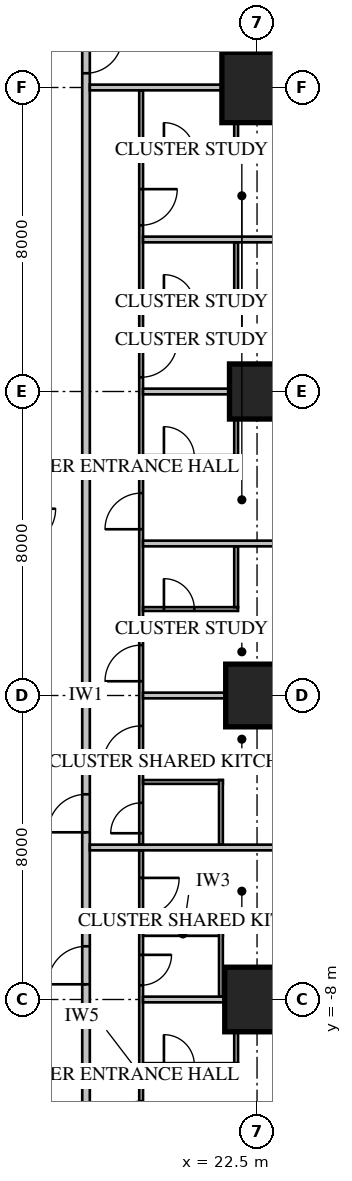
"""IFC4 building model, lengths in metres.
Left out: names, types, materials, properties, quantities, classifications, styles, units other than length and angle.
Written with IfcOpenShell. Run it as: python <this file> out.ifc"""

import sys

from ifc_helpers import new_model, si_unit, direction, frame, frame_2d, origin, origin_2d, place, context, subcontext, project, spatial, rectangle, extrude, element, fill, save


model = new_model("IFC4")
c1 = context("Model", 3, precision=1e-05, world=origin(), true_north=direction((0.0, 1.0)))
c2 = subcontext(c1, "Body", "Model", "MODEL_VIEW")
j1 = project(units=[si_unit("LENGTHUNIT", "METRE"), si_unit("PLANEANGLEUNIT", "RADIAN")], contexts=[c1])
p1 = place(None, origin())
s1 = spatial("IfcSite", under=j1, at=p1, CompositionType="ELEMENT")
p2 = place(p1, origin())
s2 = spatial("IfcBuilding", under=s1, at=p2, CompositionType="ELEMENT")
p3 = place(p2, frame((0.0, 0.0, 50.65)))
s3 = spatial("IfcBuildingStorey", under=s2, at=p3, CompositionType="ELEMENT", Elevation=50.65)
p4 = place(p3, frame((22.5, -8.0, 0.0), z_axis=(0.0, 0.0, 1.0), x_axis=(1.0, 0.0, 0.0)))
e1 = element("IfcColumn", 1, at=p4, inside=s3, PredefinedType="COLUMN", context=c2, shape_type="SweptSolid", body=[
    extrude(rectangle(XDim=1.7, YDim=1.7, at=origin_2d()), origin(), (0.0, 0.0, 1.0), 3.413),
])
p5 = place(p3, frame((22.5, 0.0, 0.0), z_axis=(0.0, 0.0, 1.0), x_axis=(1.0, 0.0, 0.0)))
e2 = element("IfcColumn", 2, at=p5, inside=s3, PredefinedType="COLUMN", context=c2, shape_type="SweptSolid", body=[
    extrude(rectangle(XDim=1.65, YDim=1.65, at=origin_2d()), origin(), (0.0, 0.0, 1.0), 3.413),
])
p6 = place(p3, frame((22.5, 8.0, 0.0), z_axis=(0.0, 0.0, 1.0), x_axis=(1.0, 0.0, 0.0)))
e3 = element("IfcColumn", 3, at=p6, inside=s3, PredefinedType="COLUMN", context=c2, shape_type="SweptSolid", body=[
    extrude(rectangle(XDim=1.45, YDim=1.45, at=origin_2d()), origin(), (0.0, 0.0, 1.0), 3.413),
])
p7 = place(p3, frame((22.5, 16.0, 0.0), z_axis=(0.0, 0.0, 1.0), x_axis=(1.0, 0.0, 0.0)))
e4 = element("IfcColumn", 4, at=p7, inside=s3, PredefinedType="COLUMN", context=c2, shape_type="SweptSolid", body=[
    extrude(rectangle(XDim=1.85, YDim=1.85, at=origin_2d()), origin(), (0.0, 0.0, 1.0), 3.413),
])
p8 = place(p3, frame((18.0, -18.0, 0.0), z_axis=(0.0, 0.0, 1.0), x_axis=(0.0, 1.0, 0.0)))
e5 = element("IfcWall", 5, at=p8, inside=s3, PredefinedType="PARTITIONING", context=c2, shape_type="SweptSolid", body=[
    extrude(rectangle(XDim=36.0, YDim=0.2, at=frame_2d((18.0, 0.0))), origin(), (0.0, 0.0, 1.0), 3.65),
])
p9 = place(p8, frame((10.4, 0.0, 0.0)))
e6 = element("IfcOpeningElement", 6, at=p9, cuts=e5, PredefinedType="OPENING", context=c2, shape_type="SweptSolid", body=[
    extrude(rectangle(XDim=1.0, YDim=2.1, at=frame_2d((0.5, 1.05))), frame((0.0, 0.12, 0.0), z_axis=(0.0, -1.0, 0.0), x_axis=(1.0, 0.0, 0.0)), (0.0, 0.0, 1.0), 0.24),
])
p10 = place(p8, frame((14.4, 0.0, 0.0)))
e7 = element("IfcOpeningElement", 7, at=p10, cuts=e5, PredefinedType="OPENING", context=c2, shape_type="SweptSolid", body=[
    extrude(rectangle(XDim=1.0, YDim=2.1, at=frame_2d((0.5, 1.05))), frame((0.0, 0.12, 0.0), z_axis=(0.0, -1.0, 0.0), x_axis=(1.0, 0.0, 0.0)), (0.0, 0.0, 1.0), 0.24),
])
p11 = place(p8, frame((0.375, 0.0, 0.0)))
e8 = element("IfcOpeningElement", 8, at=p11, cuts=e5, PredefinedType="OPENING", context=c2, shape_type="SweptSolid", body=[
    extrude(rectangle(XDim=1.0, YDim=2.1, at=frame_2d((0.5, 1.05))), frame((0.0, 0.12, 0.0), z_axis=(0.0, -1.0, 0.0), x_axis=(1.0, 0.0, 0.0)), (0.0, 0.0, 1.0), 0.24),
])
p12 = place(p8, frame((34.375, 0.0, 0.0)))
e9 = element("IfcOpeningElement", 9, at=p12, cuts=e5, PredefinedType="OPENING", context=c2, shape_type="SweptSolid", body=[
    extrude(rectangle(XDim=0.95, YDim=2.1, at=frame_2d((0.475, 1.05))), frame((0.0, 0.12, 0.0), z_axis=(0.0, -1.0, 0.0), x_axis=(1.0, 0.0, 0.0)), (0.0, 0.0, 1.0), 0.24),
])
p13 = place(p3, frame((19.45, -15.925, 0.0), z_axis=(0.0, 0.0, 1.0), x_axis=(0.0, 1.0, 0.0)))
e10 = element("IfcWall", 10, at=p13, inside=s3, PredefinedType="PARTITIONING", context=c2, shape_type="SweptSolid", body=[
    extrude(rectangle(XDim=11.85, YDim=0.1, at=frame_2d((5.925, 0.0))), origin(), (0.0, 0.0, 1.0), 3.65),
])
p14 = place(p13, frame((10.125, 0.0, 0.0)))
e11 = element("IfcOpeningElement", 11, at=p14, cuts=e10, PredefinedType="OPENING", context=c2, shape_type="SweptSolid", body=[
    extrude(rectangle(XDim=1.0, YDim=2.1, at=frame_2d((0.5, 1.05))), frame((0.0, 0.07, 0.0), z_axis=(0.0, -1.0, 0.0), x_axis=(1.0, 0.0, 0.0)), (0.0, 0.0, 1.0), 0.14),
])
p15 = place(p13, frame((8.3, 0.0, 0.0)))
e12 = element("IfcOpeningElement", 12, at=p15, cuts=e10, PredefinedType="OPENING", context=c2, shape_type="SweptSolid", body=[
    extrude(rectangle(XDim=0.8, YDim=2.1, at=frame_2d((0.4, 1.05))), frame((0.0, 0.07, 0.0), z_axis=(0.0, -1.0, 0.0), x_axis=(1.0, 0.0, 0.0)), (0.0, 0.0, 1.0), 0.14),
])
p16 = place(p13, frame((0.3, 0.0, 0.0)))
e13 = element("IfcOpeningElement", 13, at=p16, cuts=e10, PredefinedType="OPENING", context=c2, shape_type="SweptSolid", body=[
    extrude(rectangle(XDim=0.95, YDim=2.1, at=frame_2d((0.475, 1.05))), frame((0.0, 0.07, 0.0), z_axis=(0.0, -1.0, 0.0), x_axis=(1.0, 0.0, 0.0)), (0.0, 0.0, 1.0), 0.14),
])
p17 = place(p13, frame((4.3, 0.0, 0.0)))
e14 = element("IfcOpeningElement", 14, at=p17, cuts=e10, PredefinedType="OPENING", context=c2, shape_type="SweptSolid", body=[
    extrude(rectangle(XDim=0.95, YDim=2.1, at=frame_2d((0.475, 1.05))), frame((0.0, 0.07, 0.0), z_axis=(0.0, -1.0, 0.0), x_axis=(1.0, 0.0, 0.0)), (0.0, 0.0, 1.0), 0.14),
])
p18 = place(p3, frame((19.5, -6.275, 0.0), z_axis=(0.0, 0.0, 1.0), x_axis=(1.0, 0.0, 0.0)))
e15 = element("IfcWall", 15, at=p18, inside=s3, PredefinedType="PARTITIONING", context=c2, shape_type="SweptSolid", body=[
    extrude(rectangle(XDim=2.1, YDim=0.1, at=frame_2d((1.05, 0.0))), origin(), (0.0, 0.0, 1.0), 3.65),
])
p19 = place(p3, frame((21.55, -7.925, 0.0), z_axis=(0.0, 0.0, 1.0), x_axis=(0.0, 1.0, 0.0)))
e16 = element("IfcWall", 16, at=p19, inside=s3, PredefinedType="PARTITIONING", context=c2, shape_type="SweptSolid", body=[
    extrude(rectangle(XDim=1.7, YDim=0.1, at=frame_2d((0.85, 0.0))), origin(), (0.0, 0.0, 1.0), 3.65),
])
p20 = place(p3, frame((19.45, -3.925, 0.0), z_axis=(0.0, 0.0, 1.0), x_axis=(0.0, 1.0, 0.0)))
e17 = element("IfcWall", 17, at=p20, inside=s3, PredefinedType="PARTITIONING", context=c2, shape_type="SweptSolid", body=[
    extrude(rectangle(XDim=19.85, YDim=0.1, at=frame_2d((9.925, 0.0))), origin(), (0.0, 0.0, 1.0), 3.65),
])
p21 = place(p20, frame((2.125, 0.0, 0.0)))
e18 = element("IfcOpeningElement", 18, at=p21, cuts=e17, PredefinedType="OPENING", context=c2, shape_type="SweptSolid", body=[
    extrude(rectangle(XDim=1.0, YDim=2.1, at=frame_2d((0.5, 1.05))), frame((0.0, 0.07, 0.0), z_axis=(0.0, -1.0, 0.0), x_axis=(1.0, 0.0, 0.0)), (0.0, 0.0, 1.0), 0.14),
])
p22 = place(p20, frame((0.3, 0.0, 0.0)))
e19 = element("IfcOpeningElement", 19, at=p22, cuts=e17, PredefinedType="OPENING", context=c2, shape_type="SweptSolid", body=[
    extrude(rectangle(XDim=0.8, YDim=2.1, at=frame_2d((0.4, 1.05))), frame((0.0, 0.07, 0.0), z_axis=(0.0, -1.0, 0.0), x_axis=(1.0, 0.0, 0.0)), (0.0, 0.0, 1.0), 0.14),
])
p23 = place(p20, frame((4.3, 0.0, 0.0)))
e20 = element("IfcOpeningElement", 20, at=p23, cuts=e17, PredefinedType="OPENING", context=c2, shape_type="SweptSolid", body=[
    extrude(rectangle(XDim=0.95, YDim=2.1, at=frame_2d((0.475, 1.05))), frame((0.0, 0.07, 0.0), z_axis=(0.0, -1.0, 0.0), x_axis=(1.0, 0.0, 0.0)), (0.0, 0.0, 1.0), 0.14),
])
p24 = place(p20, frame((8.3, 0.0, 0.0)))
e21 = element("IfcOpeningElement", 21, at=p24, cuts=e17, PredefinedType="OPENING", context=c2, shape_type="SweptSolid", body=[
    extrude(rectangle(XDim=0.95, YDim=2.1, at=frame_2d((0.475, 1.05))), frame((0.0, 0.07, 0.0), z_axis=(0.0, -1.0, 0.0), x_axis=(1.0, 0.0, 0.0)), (0.0, 0.0, 1.0), 0.14),
])
p25 = place(p20, frame((12.3, 0.0, 0.0)))
e22 = element("IfcOpeningElement", 22, at=p25, cuts=e17, PredefinedType="OPENING", context=c2, shape_type="SweptSolid", body=[
    extrude(rectangle(XDim=0.95, YDim=2.1, at=frame_2d((0.475, 1.05))), frame((0.0, 0.07, 0.0), z_axis=(0.0, -1.0, 0.0), x_axis=(1.0, 0.0, 0.0)), (0.0, 0.0, 1.0), 0.14),
])
p26 = place(p20, frame((16.3, 0.0, 0.0)))
e23 = element("IfcOpeningElement", 23, at=p26, cuts=e17, PredefinedType="OPENING", context=c2, shape_type="SweptSolid", body=[
    extrude(rectangle(XDim=0.95, YDim=2.1, at=frame_2d((0.475, 1.05))), frame((0.0, 0.07, 0.0), z_axis=(0.0, -1.0, 0.0), x_axis=(1.0, 0.0, 0.0)), (0.0, 0.0, 1.0), 0.14),
])
p27 = place(p3, frame((19.5, -2.275, 0.0), z_axis=(0.0, 0.0, 1.0), x_axis=(1.0, 0.0, 0.0)))
e24 = element("IfcWall", 24, at=p27, inside=s3, PredefinedType="PARTITIONING", context=c2, shape_type="SweptSolid", body=[
    extrude(rectangle(XDim=2.1, YDim=0.1, at=frame_2d((1.05, 0.0))), origin(), (0.0, 0.0, 1.0), 3.65),
])
p28 = place(p3, frame((21.55, -3.925, 0.0), z_axis=(0.0, 0.0, 1.0), x_axis=(0.0, 1.0, 0.0)))
e25 = element("IfcWall", 25, at=p28, inside=s3, PredefinedType="PARTITIONING", context=c2, shape_type="SweptSolid", body=[
    extrude(rectangle(XDim=1.7, YDim=0.1, at=frame_2d((0.85, 0.0))), origin(), (0.0, 0.0, 1.0), 3.65),
])
p29 = place(p3, frame((19.5, -8.0, 0.0), z_axis=(0.0, 0.0, 1.0), x_axis=(1.0, 0.0, 0.0)))
e26 = element("IfcWall", 26, at=p29, inside=s3, PredefinedType="PARTITIONING", context=c2, shape_type="SweptSolid", body=[
    extrude(rectangle(XDim=5.2, YDim=0.15, at=frame_2d((2.6, 0.0))), origin(), (0.0, 0.0, 1.0), 3.65),
])
p30 = place(p3, frame((18.1, -4.0, 0.0), z_axis=(0.0, 0.0, 1.0), x_axis=(1.0, 0.0, 0.0)))
e27 = element("IfcWall", 27, at=p30, inside=s3, PredefinedType="PARTITIONING", context=c2, shape_type="SweptSolid", body=[
    extrude(rectangle(XDim=6.6, YDim=0.15, at=frame_2d((3.3, 0.0))), origin(), (0.0, 0.0, 1.0), 3.65),
])
p31 = place(p3, frame((19.5, 0.0, 0.0), z_axis=(0.0, 0.0, 1.0), x_axis=(1.0, 0.0, 0.0)))
e28 = element("IfcWall", 28, at=p31, inside=s3, PredefinedType="PARTITIONING", context=c2, shape_type="SweptSolid", body=[
    extrude(rectangle(XDim=5.2, YDim=0.15, at=frame_2d((2.6, 0.0))), origin(), (0.0, 0.0, 1.0), 2.888),
])
for number, where, z_axis, x_axis in (
    (29, (19.5, 4.0, 0.0), (0.0, 0.0, 1.0), (1.0, 0.0, 0.0)),
    (30, (19.5, 8.0, 0.0), (0.0, 0.0, 1.0), (1.0, 0.0, 0.0)),
    (31, (19.5, 12.0, 0.0), (0.0, 0.0, 1.0), (1.0, 0.0, 0.0)),
):
    element("IfcWall", number, at=place(p3, frame(where, z_axis=z_axis, x_axis=x_axis)), inside=s3, PredefinedType="PARTITIONING", context=c2, shape_type="SweptSolid", body=[
        extrude(rectangle(XDim=5.2, YDim=0.15, at=frame_2d((2.6, 0.0))), origin(), (0.0, 0.0, 1.0), 3.65),
    ])
p32 = place(p3, frame((18.1, 16.0, 0.0), z_axis=(0.0, 0.0, 1.0), x_axis=(1.0, 0.0, 0.0)))
e32 = element("IfcWall", 32, at=p32, inside=s3, PredefinedType="PARTITIONING", context=c2, shape_type="SweptSolid", body=[
    extrude(rectangle(XDim=6.589, YDim=0.15, at=frame_2d((3.295, 0.0))), origin(), (0.0, 0.0, 1.0), 3.65),
])
p33 = place(p3, frame((19.5, -9.725, 0.0), z_axis=(0.0, 0.0, 1.0), x_axis=(1.0, 0.0, 0.0)))
e33 = element("IfcWall", 33, at=p33, inside=s3, PredefinedType="PARTITIONING", context=c2, shape_type="SweptSolid", body=[
    extrude(rectangle(XDim=2.5, YDim=0.1, at=frame_2d((1.25, 0.0))), origin(), (0.0, 0.0, 1.0), 3.65),
])
p34 = place(p33, frame((0.55, 0.0, 0.0)))
e34 = element("IfcOpeningElement", 34, at=p34, cuts=e33, PredefinedType="OPENING", context=c2, shape_type="SweptSolid", body=[
    extrude(rectangle(XDim=0.8, YDim=2.1, at=frame_2d((0.4, 1.05))), frame((0.0, 0.07, 0.0), z_axis=(0.0, -1.0, 0.0), x_axis=(1.0, 0.0, 0.0)), (0.0, 0.0, 1.0), 0.14),
])
p35 = place(p3, frame((21.95, -9.675, 0.0), z_axis=(0.0, 0.0, 1.0), x_axis=(0.0, 1.0, 0.0)))
e35 = element("IfcWall", 35, at=p35, inside=s3, PredefinedType="PARTITIONING", context=c2, shape_type="SweptSolid", body=[
    extrude(rectangle(XDim=1.6, YDim=0.1, at=frame_2d((0.8, 0.0))), origin(), (0.0, 0.0, 1.0), 3.65),
])
p36 = place(p3, frame((19.5, 2.275, 0.0), z_axis=(0.0, 0.0, 1.0), x_axis=(1.0, 0.0, 0.0)))
e36 = element("IfcWall", 36, at=p36, inside=s3, PredefinedType="PARTITIONING", context=c2, shape_type="SweptSolid", body=[
    extrude(rectangle(XDim=2.5, YDim=0.1, at=frame_2d((1.25, 0.0))), origin(), (0.0, 0.0, 1.0), 3.65),
])
p37 = place(p36, frame((0.55, 0.0, 0.0)))
e37 = element("IfcOpeningElement", 37, at=p37, cuts=e36, PredefinedType="OPENING", context=c2, shape_type="SweptSolid", body=[
    extrude(rectangle(XDim=0.8, YDim=2.1, at=frame_2d((0.4, 1.05))), frame((0.0, 0.07, 0.0), z_axis=(0.0, -1.0, 0.0), x_axis=(1.0, 0.0, 0.0)), (0.0, 0.0, 1.0), 0.14),
])
p38 = place(p3, frame((21.95, 2.325, 0.0), z_axis=(0.0, 0.0, 1.0), x_axis=(0.0, 1.0, 0.0)))
e38 = element("IfcWall", 38, at=p38, inside=s3, PredefinedType="PARTITIONING", context=c2, shape_type="SweptSolid", body=[
    extrude(rectangle(XDim=1.6, YDim=0.1, at=frame_2d((0.8, 0.0))), origin(), (0.0, 0.0, 1.0), 3.65),
])
p39 = place(p3, frame((19.5, 6.275, 0.0), z_axis=(0.0, 0.0, 1.0), x_axis=(1.0, 0.0, 0.0)))
e39 = element("IfcWall", 39, at=p39, inside=s3, PredefinedType="PARTITIONING", context=c2, shape_type="SweptSolid", body=[
    extrude(rectangle(XDim=2.5, YDim=0.1, at=frame_2d((1.25, 0.0))), origin(), (0.0, 0.0, 1.0), 3.65),
])
p40 = place(p39, frame((0.55, 0.0, 0.0)))
e40 = element("IfcOpeningElement", 40, at=p40, cuts=e39, PredefinedType="OPENING", context=c2, shape_type="SweptSolid", body=[
    extrude(rectangle(XDim=0.8, YDim=2.1, at=frame_2d((0.4, 1.05))), frame((0.0, 0.07, 0.0), z_axis=(0.0, -1.0, 0.0), x_axis=(1.0, 0.0, 0.0)), (0.0, 0.0, 1.0), 0.14),
])
p41 = place(p3, frame((21.95, 6.325, 0.0), z_axis=(0.0, 0.0, 1.0), x_axis=(0.0, 1.0, 0.0)))
e41 = element("IfcWall", 41, at=p41, inside=s3, PredefinedType="PARTITIONING", context=c2, shape_type="SweptSolid", body=[
    extrude(rectangle(XDim=1.6, YDim=0.1, at=frame_2d((0.8, 0.0))), origin(), (0.0, 0.0, 1.0), 3.65),
])
p42 = place(p3, frame((19.5, 10.275, 0.0), z_axis=(0.0, 0.0, 1.0), x_axis=(1.0, 0.0, 0.0)))
e42 = element("IfcWall", 42, at=p42, inside=s3, PredefinedType="PARTITIONING", context=c2, shape_type="SweptSolid", body=[
    extrude(rectangle(XDim=2.5, YDim=0.1, at=frame_2d((1.25, 0.0))), origin(), (0.0, 0.0, 1.0), 3.65),
])
p43 = place(p42, frame((0.55, 0.0, 0.0)))
e43 = element("IfcOpeningElement", 43, at=p43, cuts=e42, PredefinedType="OPENING", context=c2, shape_type="SweptSolid", body=[
    extrude(rectangle(XDim=0.8, YDim=2.1, at=frame_2d((0.4, 1.05))), frame((0.0, 0.07, 0.0), z_axis=(0.0, -1.0, 0.0), x_axis=(1.0, 0.0, 0.0)), (0.0, 0.0, 1.0), 0.14),
])
p44 = place(p3, frame((21.95, 10.325, 0.0), z_axis=(0.0, 0.0, 1.0), x_axis=(0.0, 1.0, 0.0)))
e44 = element("IfcWall", 44, at=p44, inside=s3, PredefinedType="PARTITIONING", context=c2, shape_type="SweptSolid", body=[
    extrude(rectangle(XDim=1.6, YDim=0.1, at=frame_2d((0.8, 0.0))), origin(), (0.0, 0.0, 1.0), 3.65),
])
p45 = place(p3, frame((19.5, 14.275, 0.0), z_axis=(0.0, 0.0, 1.0), x_axis=(1.0, 0.0, 0.0)))
e45 = element("IfcWall", 45, at=p45, inside=s3, PredefinedType="PARTITIONING", context=c2, shape_type="SweptSolid", body=[
    extrude(rectangle(XDim=2.5, YDim=0.1, at=frame_2d((1.25, 0.0))), origin(), (0.0, 0.0, 1.0), 3.65),
])
p46 = place(p45, frame((0.55, 0.0, 0.0)))
e46 = element("IfcOpeningElement", 46, at=p46, cuts=e45, PredefinedType="OPENING", context=c2, shape_type="SweptSolid", body=[
    extrude(rectangle(XDim=0.8, YDim=2.1, at=frame_2d((0.4, 1.05))), frame((0.0, 0.07, 0.0), z_axis=(0.0, -1.0, 0.0), x_axis=(1.0, 0.0, 0.0)), (0.0, 0.0, 1.0), 0.14),
])
p47 = place(p3, frame((21.95, 14.325, 0.0), z_axis=(0.0, 0.0, 1.0), x_axis=(0.0, 1.0, 0.0)))
e47 = element("IfcWall", 47, at=p47, inside=s3, PredefinedType="PARTITIONING", context=c2, shape_type="SweptSolid", body=[
    extrude(rectangle(XDim=1.6, YDim=0.1, at=frame_2d((0.8, 0.0))), origin(), (0.0, 0.0, 1.0), 3.65),
])
p48 = place(p9, origin())
e48 = element("IfcDoor", 48, at=p48, inside=s3, OperationType="SINGLE_SWING_LEFT", PredefinedType="DOOR", context=c2, shape_type="SweptSolid", body=[
    extrude(rectangle(XDim=1.0, YDim=2.1, at=frame_2d((0.5, 1.05))), frame((0.0, 0.025, 0.0), z_axis=(0.0, -1.0, 0.0), x_axis=(1.0, 0.0, 0.0)), (0.0, 0.0, 1.0), 0.05),
])
fill(e6, e48)
p49 = place(p14, origin())
e49 = element("IfcDoor", 49, at=p49, inside=s3, OperationType="SINGLE_SWING_RIGHT", PredefinedType="DOOR", context=c2, shape_type="SweptSolid", body=[
    extrude(rectangle(XDim=1.0, YDim=2.1, at=frame_2d((0.5, 1.05))), frame((0.0, 0.025, 0.0), z_axis=(0.0, -1.0, 0.0), x_axis=(1.0, 0.0, 0.0)), (0.0, 0.0, 1.0), 0.05),
])
fill(e11, e49)
p50 = place(p15, origin())
e50 = element("IfcDoor", 50, at=p50, inside=s3, OperationType="SINGLE_SWING_RIGHT", PredefinedType="DOOR", context=c2, shape_type="SweptSolid", body=[
    extrude(rectangle(XDim=0.8, YDim=2.1, at=frame_2d((0.4, 1.05))), frame((0.0, 0.025, 0.0), z_axis=(0.0, -1.0, 0.0), x_axis=(1.0, 0.0, 0.0)), (0.0, 0.0, 1.0), 0.05),
])
fill(e12, e50)
p51 = place(p10, origin())
e51 = element("IfcDoor", 51, at=p51, inside=s3, OperationType="SINGLE_SWING_LEFT", PredefinedType="DOOR", context=c2, shape_type="SweptSolid", body=[
    extrude(rectangle(XDim=1.0, YDim=2.1, at=frame_2d((0.5, 1.05))), frame((0.0, 0.025, 0.0), z_axis=(0.0, -1.0, 0.0), x_axis=(1.0, 0.0, 0.0)), (0.0, 0.0, 1.0), 0.05),
])
fill(e7, e51)
p52 = place(p21, origin())
e52 = element("IfcDoor", 52, at=p52, inside=s3, OperationType="SINGLE_SWING_LEFT", PredefinedType="DOOR", context=c2, shape_type="SweptSolid", body=[
    extrude(rectangle(XDim=1.0, YDim=2.1, at=frame_2d((0.5, 1.05))), frame((0.0, 0.025, 0.0), z_axis=(0.0, -1.0, 0.0), x_axis=(1.0, 0.0, 0.0)), (0.0, 0.0, 1.0), 0.05),
])
fill(e18, e52)
p53 = place(p22, origin())
e53 = element("IfcDoor", 53, at=p53, inside=s3, OperationType="SINGLE_SWING_LEFT", PredefinedType="DOOR", context=c2, shape_type="SweptSolid", body=[
    extrude(rectangle(XDim=0.8, YDim=2.1, at=frame_2d((0.4, 1.05))), frame((0.0, 0.025, 0.0), z_axis=(0.0, -1.0, 0.0), x_axis=(1.0, 0.0, 0.0)), (0.0, 0.0, 1.0), 0.05),
])
fill(e19, e53)
p54 = place(p17, origin())
e54 = element("IfcDoor", 54, at=p54, inside=s3, OperationType="SINGLE_SWING_LEFT", PredefinedType="DOOR", context=c2, shape_type="SweptSolid", body=[
    extrude(rectangle(XDim=0.95, YDim=2.1, at=frame_2d((0.475, 1.05))), frame((0.0, 0.025, 0.0), z_axis=(0.0, -1.0, 0.0), x_axis=(1.0, 0.0, 0.0)), (0.0, 0.0, 1.0), 0.05),
])
fill(e14, e54)
p55 = place(p34, origin())
e55 = element("IfcDoor", 55, at=p55, inside=s3, OperationType="SINGLE_SWING_LEFT", PredefinedType="DOOR", context=c2, shape_type="SweptSolid", body=[
    extrude(rectangle(XDim=0.8, YDim=2.1, at=frame_2d((0.4, 1.05))), frame((0.0, 0.025, 0.0), z_axis=(0.0, -1.0, 0.0), x_axis=(1.0, 0.0, 0.0)), (0.0, 0.0, 1.0), 0.05),
])
fill(e34, e55)
p56 = place(p23, origin())
e56 = element("IfcDoor", 56, at=p56, inside=s3, OperationType="SINGLE_SWING_LEFT", PredefinedType="DOOR", context=c2, shape_type="SweptSolid", body=[
    extrude(rectangle(XDim=0.95, YDim=2.1, at=frame_2d((0.475, 1.05))), frame((0.0, 0.025, 0.0), z_axis=(0.0, -1.0, 0.0), x_axis=(1.0, 0.0, 0.0)), (0.0, 0.0, 1.0), 0.05),
])
fill(e20, e56)
p57 = place(p37, origin())
e57 = element("IfcDoor", 57, at=p57, inside=s3, OperationType="SINGLE_SWING_LEFT", PredefinedType="DOOR", context=c2, shape_type="SweptSolid", body=[
    extrude(rectangle(XDim=0.8, YDim=2.1, at=frame_2d((0.4, 1.05))), frame((0.0, 0.025, 0.0), z_axis=(0.0, -1.0, 0.0), x_axis=(1.0, 0.0, 0.0)), (0.0, 0.0, 1.0), 0.05),
])
fill(e37, e57)
p58 = place(p24, origin())
e58 = element("IfcDoor", 58, at=p58, inside=s3, OperationType="SINGLE_SWING_LEFT", PredefinedType="DOOR", context=c2, shape_type="SweptSolid", body=[
    extrude(rectangle(XDim=0.95, YDim=2.1, at=frame_2d((0.475, 1.05))), frame((0.0, 0.025, 0.0), z_axis=(0.0, -1.0, 0.0), x_axis=(1.0, 0.0, 0.0)), (0.0, 0.0, 1.0), 0.05),
])
fill(e21, e58)
p59 = place(p40, origin())
e59 = element("IfcDoor", 59, at=p59, inside=s3, OperationType="SINGLE_SWING_LEFT", PredefinedType="DOOR", context=c2, shape_type="SweptSolid", body=[
    extrude(rectangle(XDim=0.8, YDim=2.1, at=frame_2d((0.4, 1.05))), frame((0.0, 0.025, 0.0), z_axis=(0.0, -1.0, 0.0), x_axis=(1.0, 0.0, 0.0)), (0.0, 0.0, 1.0), 0.05),
])
fill(e40, e59)
p60 = place(p25, origin())
e60 = element("IfcDoor", 60, at=p60, inside=s3, OperationType="SINGLE_SWING_RIGHT", PredefinedType="DOOR", context=c2, shape_type="SweptSolid", body=[
    extrude(rectangle(XDim=0.95, YDim=2.1, at=frame_2d((0.475, 1.05))), frame((0.0, 0.025, 0.0), z_axis=(0.0, -1.0, 0.0), x_axis=(1.0, 0.0, 0.0)), (0.0, 0.0, 1.0), 0.05),
])
fill(e22, e60)
p61 = place(p43, origin())
e61 = element("IfcDoor", 61, at=p61, inside=s3, OperationType="SINGLE_SWING_LEFT", PredefinedType="DOOR", context=c2, shape_type="SweptSolid", body=[
    extrude(rectangle(XDim=0.8, YDim=2.1, at=frame_2d((0.4, 1.05))), frame((0.0, 0.025, 0.0), z_axis=(0.0, -1.0, 0.0), x_axis=(1.0, 0.0, 0.0)), (0.0, 0.0, 1.0), 0.05),
])
fill(e43, e61)
p62 = place(p26, origin())
e62 = element("IfcDoor", 62, at=p62, inside=s3, OperationType="SINGLE_SWING_RIGHT", PredefinedType="DOOR", context=c2, shape_type="SweptSolid", body=[
    extrude(rectangle(XDim=0.95, YDim=2.1, at=frame_2d((0.475, 1.05))), frame((0.0, 0.025, 0.0), z_axis=(0.0, -1.0, 0.0), x_axis=(1.0, 0.0, 0.0)), (0.0, 0.0, 1.0), 0.05),
])
fill(e23, e62)
p63 = place(p46, origin())
e63 = element("IfcDoor", 63, at=p63, inside=s3, OperationType="SINGLE_SWING_LEFT", PredefinedType="DOOR", context=c2, shape_type="SweptSolid", body=[
    extrude(rectangle(XDim=0.8, YDim=2.1, at=frame_2d((0.4, 1.05))), frame((0.0, 0.025, 0.0), z_axis=(0.0, -1.0, 0.0), x_axis=(1.0, 0.0, 0.0)), (0.0, 0.0, 1.0), 0.05),
])
fill(e46, e63)
p64 = place(p12, origin())
e64 = element("IfcDoor", 64, at=p64, inside=s3, OperationType="SINGLE_SWING_RIGHT", PredefinedType="DOOR", context=c2, shape_type="SweptSolid", body=[
    extrude(rectangle(XDim=0.95, YDim=2.1, at=frame_2d((0.475, 1.05))), frame((0.0, 0.025, 0.0), z_axis=(0.0, -1.0, 0.0), x_axis=(1.0, 0.0, 0.0)), (0.0, 0.0, 1.0), 0.05),
])
fill(e9, e64)
save(model, sys.argv[1])
